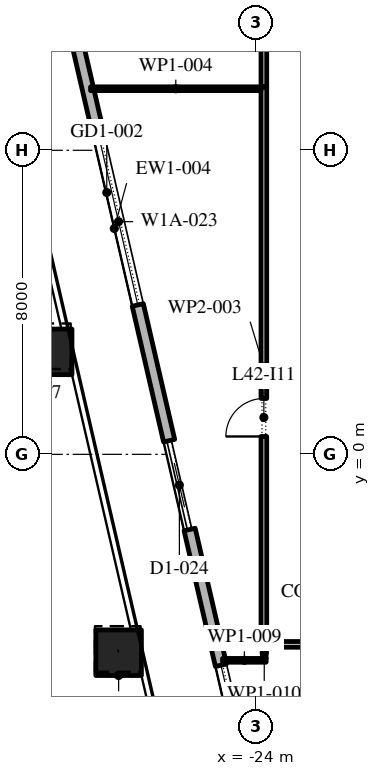
"""IFC4 building model, lengths in metres.
Left out: names, types, materials, properties, quantities, classifications, styles, units other than length and angle.
Written with IfcOpenShell. Run it as: python <this file> out.ifc"""

import sys

from ifc_helpers import new_model, si_unit, direction, frame, frame_2d, origin, origin_2d, place, context, subcontext, project, spatial, rectangle, extrude, element, fill, save


model = new_model("IFC4")
c1 = context("Model", 3, precision=1e-05, world=origin(), true_north=direction((0.0, 1.0)))
c2 = subcontext(c1, "Body", "Model", "MODEL_VIEW")
j1 = project(units=[si_unit("LENGTHUNIT", "METRE"), si_unit("PLANEANGLEUNIT", "RADIAN")], contexts=[c1])
p1 = place(None, origin())
s1 = spatial("IfcSite", under=j1, at=p1, CompositionType="ELEMENT")
p2 = place(p1, origin())
s2 = spatial("IfcBuilding", under=s1, at=p2, CompositionType="ELEMENT")
p3 = place(p2, frame((0.0, 0.0, 192.6)))
s3 = spatial("IfcBuildingStorey", under=s2, at=p3, CompositionType="ELEMENT", Elevation=192.6)
p4 = place(p3, frame((-29.449, 2.696, 0.0), z_axis=(-0.0080747472, 0.035087390713, 0.999351626541), x_axis=(-0.974526982896, -0.224270282488, 0.0)))
e1 = element("IfcColumn", 1, at=p4, inside=s3, PredefinedType="COLUMN", context=c2, shape_type="SweptSolid", body=[
    extrude(rectangle(XDim=1.2, YDim=1.2, at=origin_2d()), origin(), (0.0, 0.0, 1.0), 4.203),
])
p5 = place(p3, frame((-27.622, -5.219, 0.0), z_axis=(-0.005404472139, 0.023419379268, 0.999711120452), x_axis=(-0.974391195695, -0.224859506699, 0.0)))
e2 = element("IfcColumn", 2, at=p5, inside=s3, PredefinedType="COLUMN", context=c2, shape_type="SweptSolid", body=[
    extrude(rectangle(XDim=1.2, YDim=1.2, at=origin_2d()), origin(), (0.0, 0.0, 1.0), 4.201),
])
p6 = place(p3, frame((-33.157, 30.092, 0.0), z_axis=(0.0, 0.0, 1.0), x_axis=(0.224950279389, -0.974370243697, 0.0)))
e3 = element("IfcWall", 3, at=p6, inside=s3, PredefinedType="STANDARD", context=c2, shape_type="SweptSolid", body=[
    extrude(rectangle(XDim=49.5, YDim=0.3, at=frame_2d((24.75, 0.0))), origin(), (0.0, 0.0, 1.0), 4.0),
])
p7 = place(p6, frame((2.207, 0.0, 0.0)))
e4 = element("IfcOpeningElement", 4, at=p7, cuts=e3, PredefinedType="OPENING", context=c2, shape_type="SweptSolid", body=[
    extrude(rectangle(XDim=2.4, YDim=3.5, at=frame_2d((1.2, 1.75))), frame((0.0, 0.16, 0.0), z_axis=(0.0, -1.0, 0.0), x_axis=(1.0, 0.0, 0.0)), (0.0, 0.0, 1.0), 0.32),
])
p8 = place(p6, frame((8.121, 0.0, 0.45)))
e5 = element("IfcOpeningElement", 5, at=p8, cuts=e3, PredefinedType="OPENING", context=c2, shape_type="SweptSolid", body=[
    extrude(rectangle(XDim=4.5, YDim=2.825, at=frame_2d((2.25, 1.413))), frame((0.0, 0.16, 0.0), z_axis=(0.0, -1.0, 0.0), x_axis=(1.0, 0.0, 0.0)), (0.0, 0.0, 1.0), 0.32),
])
p9 = place(p6, frame((15.236, 0.0, 0.45)))
e6 = element("IfcOpeningElement", 6, at=p9, cuts=e3, PredefinedType="OPENING", context=c2, shape_type="SweptSolid", body=[
    extrude(rectangle(XDim=4.5, YDim=2.95, at=frame_2d((2.25, 1.475))), frame((0.0, 0.16, 0.0), z_axis=(0.0, -1.0, 0.0), x_axis=(1.0, 0.0, 0.0)), (0.0, 0.0, 1.0), 0.32),
])
p10 = place(p6, frame((22.35, 0.0, 0.45)))
e7 = element("IfcOpeningElement", 7, at=p10, cuts=e3, PredefinedType="OPENING", context=c2, shape_type="SweptSolid", body=[
    extrude(rectangle(XDim=4.5, YDim=3.0, at=frame_2d((2.25, 1.5))), frame((0.0, 0.16, 0.0), z_axis=(0.0, -1.0, 0.0), x_axis=(1.0, 0.0, 0.0)), (0.0, 0.0, 1.0), 0.32),
])
p11 = place(p6, frame((30.514, 0.0, 0.0)))
e8 = element("IfcOpeningElement", 8, at=p11, cuts=e3, PredefinedType="OPENING", context=c2, shape_type="SweptSolid", body=[
    extrude(rectangle(XDim=2.4, YDim=3.5, at=frame_2d((1.2, 1.75))), frame((0.0, 0.16, 0.0), z_axis=(0.0, -1.0, 0.0), x_axis=(1.0, 0.0, 0.0)), (0.0, 0.0, 1.0), 0.32),
])
p12 = place(p6, frame((36.579, 0.0, 0.45)))
e9 = element("IfcOpeningElement", 9, at=p12, cuts=e3, PredefinedType="OPENING", context=c2, shape_type="SweptSolid", body=[
    extrude(rectangle(XDim=4.5, YDim=3.05, at=frame_2d((2.25, 1.525))), frame((0.0, 0.16, 0.0), z_axis=(0.0, -1.0, 0.0), x_axis=(1.0, 0.0, 0.0)), (0.0, 0.0, 1.0), 0.32),
])
p13 = place(p6, frame((43.693, 0.0, 0.45)))
e10 = element("IfcOpeningElement", 10, at=p13, cuts=e3, PredefinedType="OPENING", context=c2, shape_type="SweptSolid", body=[
    extrude(rectangle(XDim=4.5, YDim=3.05, at=frame_2d((2.25, 1.525))), frame((0.0, 0.16, 0.0), z_axis=(0.0, -1.0, 0.0), x_axis=(1.0, 0.0, 0.0)), (0.0, 0.0, 1.0), 0.32),
])
p14 = place(p3, frame((-23.8, -5.075, 0.0), z_axis=(0.0, 0.0, 1.0), x_axis=(0.0, 1.0, 0.0)))
e11 = element("IfcWall", 11, at=p14, inside=s3, PredefinedType="PARTITIONING", context=c2, shape_type="SweptSolid", body=[
    extrude(rectangle(XDim=14.745, YDim=0.15, at=frame_2d((7.373, 0.0))), origin(), (0.0, 0.0, 1.0), 4.0),
])
p15 = place(p14, frame((5.545, 0.0, 0.0)))
e12 = element("IfcOpeningElement", 12, at=p15, cuts=e11, PredefinedType="OPENING", context=c2, shape_type="SweptSolid", body=[
    extrude(rectangle(XDim=1.0, YDim=2.1, at=frame_2d((0.5, 1.05))), frame((0.0, 0.085, 0.0), z_axis=(0.0, -1.0, 0.0), x_axis=(1.0, 0.0, 0.0)), (0.0, 0.0, 1.0), 0.17),
])
p16 = place(p3, frame((-23.875, 9.62, 0.0), z_axis=(0.0, 0.0, 1.0), x_axis=(-1.0, 0.0, 0.0)))
e13 = element("IfcWall", 13, at=p16, inside=s3, PredefinedType="PARTITIONING", context=c2, shape_type="SweptSolid", body=[
    extrude(rectangle(XDim=4.485, YDim=0.1, at=frame_2d((2.243, 0.0))), origin(), (0.0, 0.0, 1.0), 4.0),
])
p17 = place(p3, frame((-23.8, 9.67, 0.0), z_axis=(0.0, 0.0, 1.0), x_axis=(0.0, 1.0, 0.0)))
e14 = element("IfcWall", 14, at=p17, inside=s3, PredefinedType="PARTITIONING", context=c2, shape_type="SweptSolid", body=[
    extrude(rectangle(XDim=6.83, YDim=0.15, at=frame_2d((3.415, 0.0))), origin(), (0.0, 0.0, 1.0), 4.0),
])
p18 = place(p17, frame((1.48, 0.0, 0.0)))
e15 = element("IfcOpeningElement", 15, at=p18, cuts=e14, PredefinedType="OPENING", context=c2, shape_type="SweptSolid", body=[
    extrude(rectangle(XDim=1.0, YDim=2.1, at=frame_2d((0.5, 1.05))), frame((0.0, 0.085, 0.0), z_axis=(0.0, -1.0, 0.0), x_axis=(1.0, 0.0, 0.0)), (0.0, 0.0, 1.0), 0.17),
])
p19 = place(p3, frame((-23.74, -5.42, 0.0), z_axis=(0.0, 0.0, 1.0), x_axis=(-1.0, 0.0, 0.0)))
e16 = element("IfcWall", 16, at=p19, inside=s3, PredefinedType="PARTITIONING", context=c2, shape_type="SweptSolid", body=[
    extrude(rectangle(XDim=1.147, YDim=0.1, at=frame_2d((0.573, 0.0))), origin(), (0.0, 0.0, 1.0), 4.0),
])
p20 = place(p3, frame((-23.79, -5.075, 0.0), z_axis=(0.0, 0.0, 1.0), x_axis=(0.0, -1.0, 0.0)))
e17 = element("IfcWall", 17, at=p20, inside=s3, PredefinedType="PARTITIONING", context=c2, shape_type="SweptSolid", body=[
    extrude(rectangle(XDim=0.295, YDim=0.1, at=frame_2d((0.147, 0.0))), origin(), (0.0, 0.0, 1.0), 4.0),
])
p21 = place(p3, frame((-10.05, -5.0, 0.0), z_axis=(0.0, 0.0, 1.0), x_axis=(-1.0, 0.0, 0.0)))
e18 = element("IfcWall", 18, at=p21, inside=s3, PredefinedType="PARTITIONING", context=c2, shape_type="SweptSolid", body=[
    extrude(rectangle(XDim=13.665, YDim=0.15, at=frame_2d((6.833, 0.0))), origin(), (0.0, 0.0, 1.0), 4.0),
])
p22 = place(p21, frame((5.09, 0.0, 0.0)))
e19 = element("IfcOpeningElement", 19, at=p22, cuts=e18, PredefinedType="OPENING", context=c2, shape_type="SweptSolid", body=[
    extrude(rectangle(XDim=1.0, YDim=2.1, at=frame_2d((0.5, 1.05))), frame((0.0, 0.085, 0.0), z_axis=(0.0, -1.0, 0.0), x_axis=(1.0, 0.0, 0.0)), (0.0, 0.0, 1.0), 0.17),
])
p23 = place(p10, origin())
e20 = element("IfcWindow", 20, at=p23, inside=s3, PartitioningType="DOUBLE_PANEL_VERTICAL", PredefinedType="WINDOW", context=c2, shape_type="SweptSolid", body=[
    extrude(rectangle(XDim=4.5, YDim=3.0, at=frame_2d((2.25, 1.5))), frame((0.0, 0.03, 0.0), z_axis=(0.0, -1.0, 0.0), x_axis=(1.0, 0.0, 0.0)), (0.0, 0.0, 1.0), 0.06),
])
fill(e7, e20)
p24 = place(p11, origin())
e21 = element("IfcDoor", 21, at=p24, inside=s3, OperationType="DOUBLE_DOOR_SLIDING", PredefinedType="DOOR", context=c2, shape_type="SweptSolid", body=[
    extrude(rectangle(XDim=2.4, YDim=3.5, at=frame_2d((1.2, 1.75))), frame((0.0, 0.025, 0.0), z_axis=(0.0, -1.0, 0.0), x_axis=(1.0, 0.0, 0.0)), (0.0, 0.0, 1.0), 0.05),
])
fill(e8, e21)
p25 = place(p12, origin())
e22 = element("IfcWindow", 22, at=p25, inside=s3, PartitioningType="DOUBLE_PANEL_VERTICAL", PredefinedType="WINDOW", context=c2, shape_type="SweptSolid", body=[
    extrude(rectangle(XDim=4.5, YDim=3.05, at=frame_2d((2.25, 1.525))), frame((0.0, 0.03, 0.0), z_axis=(0.0, -1.0, 0.0), x_axis=(1.0, 0.0, 0.0)), (0.0, 0.0, 1.0), 0.06),
])
fill(e9, e22)
p26 = place(p15, origin())
e23 = element("IfcDoor", 23, at=p26, inside=s3, OperationType="SINGLE_SWING_RIGHT", PredefinedType="DOOR", context=c2, shape_type="SweptSolid", body=[
    extrude(rectangle(XDim=1.0, YDim=2.1, at=frame_2d((0.5, 1.05))), frame((0.0, 0.025, 0.0), z_axis=(0.0, -1.0, 0.0), x_axis=(1.0, 0.0, 0.0)), (0.0, 0.0, 1.0), 0.05),
])
fill(e12, e23)
save(model, sys.argv[1])
